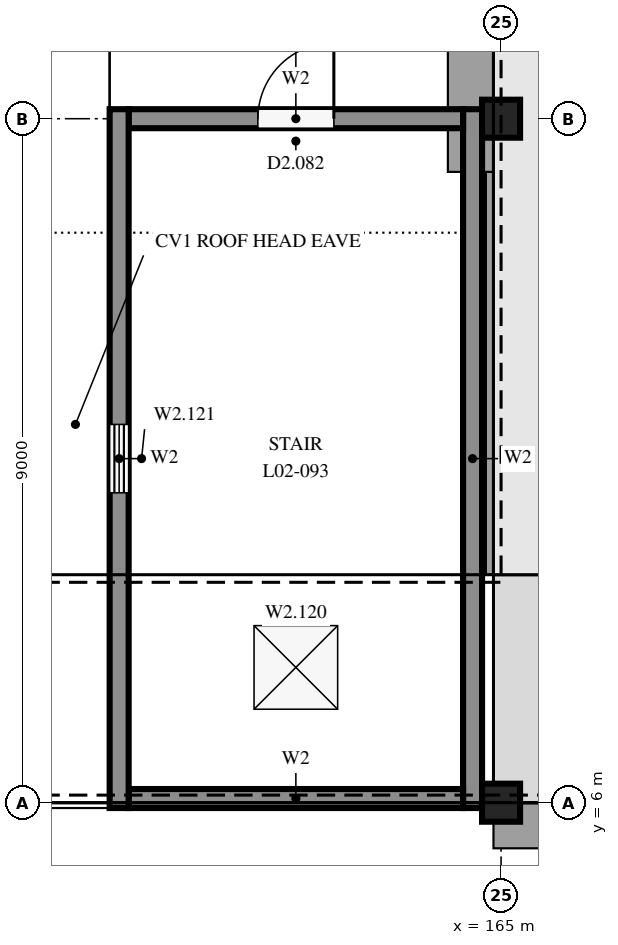
"""IFC4 building model, lengths in metres.
Left out: names, types, materials, properties, quantities, classifications, styles, units other than length and angle.
Written with IfcOpenShell. Run it as: python <this file> out.ifc"""

import sys

from ifc_helpers import new_model, si_unit, direction, frame, frame_2d, origin, origin_2d, place, context, subcontext, project, spatial, rectangle, extrude, element, fill, save


model = new_model("IFC4")
c1 = context("Model", 3, precision=1e-05, world=origin(), true_north=direction((0.0, 1.0)))
c2 = subcontext(c1, "Body", "Model", "MODEL_VIEW")
j1 = project(units=[si_unit("LENGTHUNIT", "METRE"), si_unit("PLANEANGLEUNIT", "RADIAN")], contexts=[c1])
p1 = place(None, origin())
s1 = spatial("IfcSite", under=j1, at=p1, CompositionType="ELEMENT")
p2 = place(p1, origin())
s2 = spatial("IfcBuilding", under=s1, at=p2, CompositionType="ELEMENT")
p3 = place(p2, frame((0.0, 0.0, 8.1)))
s3 = spatial("IfcBuildingStorey", under=s2, at=p3, CompositionType="ELEMENT", Elevation=8.1)
p4 = place(p3, frame((159.975, 5.93, 0.0), z_axis=(0.0, 0.0, 1.0), x_axis=(0.0, 1.0, 0.0)))
e1 = element("IfcWall", 1, at=p4, inside=s3, PredefinedType="SOLIDWALL", context=c2, shape_type="SweptSolid", body=[
    extrude(rectangle(XDim=9.195, YDim=0.25, at=frame_2d((4.598, 0.0))), origin(), (0.0, 0.0, 1.0), 2.45),
])
p5 = place(p4, frame((4.147, 0.0, 0.9)))
e2 = element("IfcOpeningElement", 2, at=p5, cuts=e1, PredefinedType="OPENING", context=c2, shape_type="SweptSolid", body=[
    extrude(rectangle(XDim=0.9, YDim=1.2, at=frame_2d((0.45, 0.6))), frame((0.0, 0.135, 0.0), z_axis=(0.0, -1.0, 0.0), x_axis=(1.0, 0.0, 0.0)), (0.0, 0.0, 1.0), 0.27),
])
p6 = place(p3, frame((164.625, 5.93, 0.0), z_axis=(0.0, 0.0, 1.0), x_axis=(0.0, 1.0, 0.0)))
e3 = element("IfcWall", 3, at=p6, inside=s3, PredefinedType="SOLIDWALL", context=c2, shape_type="SweptSolid", body=[
    extrude(rectangle(XDim=9.195, YDim=0.25, at=frame_2d((4.598, 0.0))), origin(), (0.0, 0.0, 1.0), 2.45),
])
p7 = place(p3, frame((160.1, 6.055, 0.0), z_axis=(0.0, 0.0, 1.0), x_axis=(1.0, 0.0, 0.0)))
e4 = element("IfcWall", 4, at=p7, inside=s3, PredefinedType="SOLIDWALL", context=c2, shape_type="SweptSolid", body=[
    extrude(rectangle(XDim=4.4, YDim=0.25, at=frame_2d((2.2, 0.0))), origin(), (0.0, 0.0, 1.0), 2.45),
])
p8 = place(p3, frame((160.1, 15.0, 0.0), z_axis=(0.0, 0.0, 1.0), x_axis=(1.0, 0.0, 0.0)))
e5 = element("IfcWall", 5, at=p8, inside=s3, PredefinedType="SOLIDWALL", context=c2, shape_type="SweptSolid", body=[
    extrude(rectangle(XDim=4.4, YDim=0.25, at=frame_2d((2.2, 0.0))), origin(), (0.0, 0.0, 1.0), 2.45),
])
p9 = place(p8, frame((1.7, 0.0, 0.0)))
e6 = element("IfcOpeningElement", 6, at=p9, cuts=e5, PredefinedType="OPENING", context=c2, shape_type="SweptSolid", body=[
    extrude(rectangle(XDim=1.0, YDim=2.1, at=frame_2d((0.5, 1.05))), frame((0.0, 0.135, 0.0), z_axis=(0.0, -1.0, 0.0), x_axis=(1.0, 0.0, 0.0)), (0.0, 0.0, 1.0), 0.27),
])
p10 = place(p3, frame((165.0, 6.0, 0.0), z_axis=(0.0, 0.0, 1.0), x_axis=(1.0, 0.0, 0.0)))
e7 = element("IfcColumn", 7, at=p10, inside=s3, PredefinedType="COLUMN", context=c2, shape_type="SweptSolid", body=[
    extrude(rectangle(XDim=0.5, YDim=0.5, at=origin_2d()), origin(), (0.0, 0.0, 1.0), 3.36),
])
p11 = place(p3, frame((165.0, 15.0, 0.0), z_axis=(0.0, 0.0, 1.0), x_axis=(1.0, 0.0, 0.0)))
e8 = element("IfcColumn", 8, at=p11, inside=s3, PredefinedType="COLUMN", context=c2, shape_type="SweptSolid", body=[
    extrude(rectangle(XDim=0.5, YDim=0.5, at=origin_2d()), origin(), (0.0, 0.0, 1.0), 2.41),
])
p12 = place(p3, frame((0.0, 0.0, 2.45)))
p13 = place(p12, frame((162.3, 7.78, 0.0)))
p14 = place(p13, frame((0.0, 0.0, 0.15)))
e9 = element("IfcWindow", 9, at=p14, inside=s3, PartitioningType="SINGLE_PANEL", PredefinedType="SKYLIGHT", context=c2, shape_type="SweptSolid", body=[
    extrude(rectangle(XDim=1.1, YDim=1.1, at=origin_2d()), origin(), (0.0, 0.0, 1.0), 0.05),
])
p15 = place(p9, origin())
e10 = element("IfcDoor", 10, at=p15, inside=s3, OperationType="SINGLE_SWING_RIGHT", PredefinedType="DOOR", context=c2, shape_type="SweptSolid", body=[
    extrude(rectangle(XDim=1.0, YDim=2.1, at=frame_2d((0.5, 1.05))), frame((0.0, 0.025, 0.0), z_axis=(0.0, -1.0, 0.0), x_axis=(1.0, 0.0, 0.0)), (0.0, 0.0, 1.0), 0.05),
])
fill(e6, e10)
p16 = place(p5, origin())
e11 = element("IfcWindow", 11, at=p16, inside=s3, PartitioningType="SINGLE_PANEL", PredefinedType="WINDOW", context=c2, shape_type="SweptSolid", body=[
    extrude(rectangle(XDim=0.9, YDim=1.2, at=frame_2d((0.45, 0.6))), frame((0.0, 0.03, 0.0), z_axis=(0.0, -1.0, 0.0), x_axis=(1.0, 0.0, 0.0)), (0.0, 0.0, 1.0), 0.06),
])
fill(e2, e11)
save(model, sys.argv[1])
